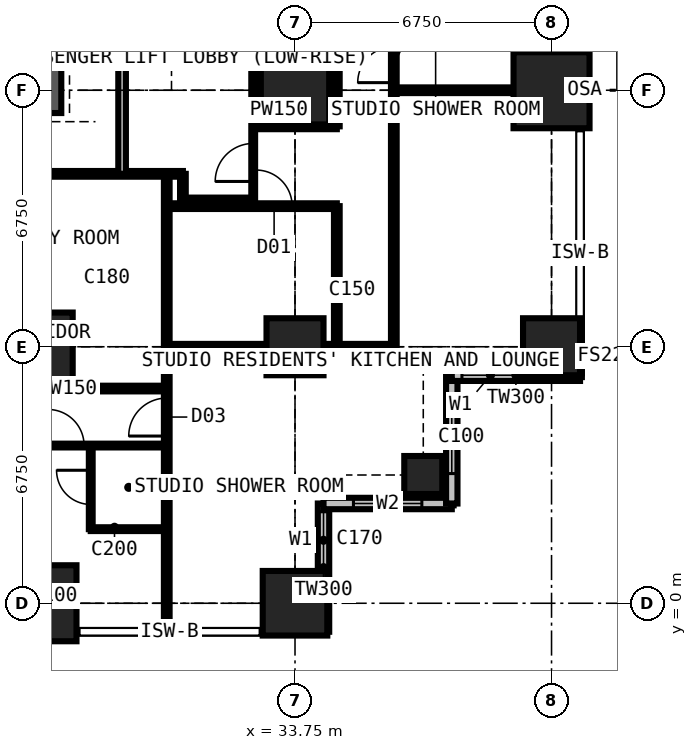
"""IFC4 building model, lengths in metres.
Left out: names, types, materials, properties, quantities, classifications, styles, units other than length and angle.
Written with IfcOpenShell. Run it as: python <this file> out.ifc"""

import sys

from ifc_helpers import new_model, si_unit, direction, frame, frame_2d, origin, origin_2d, place, context, subcontext, project, spatial, rectangle, extrude, element, fill, save


model = new_model("IFC4")
c1 = context("Model", 3, precision=1e-05, world=origin(), true_north=direction((0.0, 1.0)))
c2 = subcontext(c1, "Body", "Model", "MODEL_VIEW")
j1 = project(units=[si_unit("LENGTHUNIT", "METRE"), si_unit("PLANEANGLEUNIT", "RADIAN")], contexts=[c1])
p1 = place(None, origin())
s1 = spatial("IfcSite", under=j1, at=p1, CompositionType="ELEMENT")
p2 = place(p1, origin())
s2 = spatial("IfcBuilding", under=s1, at=p2, CompositionType="ELEMENT")
p3 = place(p2, frame((0.0, 0.0, 134.1)))
s3 = spatial("IfcBuildingStorey", under=s2, at=p3, CompositionType="ELEMENT", Elevation=134.1)
p4 = place(p3, frame((27.0, 0.0, 0.0), z_axis=(0.0, 0.0, 1.0), x_axis=(1.0, 0.0, 0.0)))
e1 = element("IfcColumn", 1, at=p4, inside=s3, PredefinedType="COLUMN", context=c2, shape_type="SweptSolid", body=[
    extrude(rectangle(XDim=2.0, YDim=2.0, at=origin_2d()), origin(), (0.0, 0.0, 1.0), 3.6),
])
p5 = place(p3, frame((27.0, 6.75, 0.0), z_axis=(0.0, 0.0, 1.0), x_axis=(1.0, 0.0, 0.0)))
e2 = element("IfcColumn", 2, at=p5, inside=s3, PredefinedType="COLUMN", context=c2, shape_type="SweptSolid", body=[
    extrude(rectangle(XDim=1.8, YDim=1.8, at=origin_2d()), origin(), (0.0, 0.0, 1.0), 3.6),
])
p6 = place(p3, frame((33.75, 0.0, 0.0), z_axis=(0.0, 0.0, 1.0), x_axis=(1.0, 0.0, 0.0)))
e3 = element("IfcColumn", 3, at=p6, inside=s3, PredefinedType="COLUMN", context=c2, shape_type="SweptSolid", body=[
    extrude(rectangle(XDim=1.7, YDim=1.7, at=origin_2d()), origin(), (0.0, 0.0, 1.0), 3.6),
])
p7 = place(p3, frame((33.75, 6.75, 0.0), z_axis=(0.0, 0.0, 1.0), x_axis=(1.0, 0.0, 0.0)))
e4 = element("IfcColumn", 4, at=p7, inside=s3, PredefinedType="COLUMN", context=c2, shape_type="SweptSolid", body=[
    extrude(rectangle(XDim=1.5, YDim=1.5, at=origin_2d()), origin(), (0.0, 0.0, 1.0), 3.6),
])
p8 = place(p3, frame((33.75, 13.5, 0.0), z_axis=(0.0, 0.0, 1.0), x_axis=(1.0, 0.0, 0.0)))
e5 = element("IfcColumn", 5, at=p8, inside=s3, PredefinedType="COLUMN", context=c2, shape_type="SweptSolid", body=[
    extrude(rectangle(XDim=1.8, YDim=1.8, at=origin_2d()), origin(), (0.0, 0.0, 1.0), 3.6),
])
p9 = place(p3, frame((37.125, 3.375, 0.0), z_axis=(0.0, 0.0, 1.0), x_axis=(1.0, 0.0, 0.0)))
e6 = element("IfcColumn", 6, at=p9, inside=s3, PredefinedType="COLUMN", context=c2, shape_type="SweptSolid", body=[
    extrude(rectangle(XDim=1.0, YDim=1.0, at=origin_2d()), origin(), (0.0, 0.0, 1.0), 3.6),
])
p10 = place(p3, frame((40.5, 6.75, 0.0), z_axis=(0.0, 0.0, 1.0), x_axis=(1.0, 0.0, 0.0)))
e7 = element("IfcColumn", 7, at=p10, inside=s3, PredefinedType="COLUMN", context=c2, shape_type="SweptSolid", body=[
    extrude(rectangle(XDim=1.5, YDim=1.5, at=origin_2d()), origin(), (0.0, 0.0, 1.0), 3.6),
])
p11 = place(p3, frame((40.5, 13.5, 0.0), z_axis=(0.0, 0.0, 1.0), x_axis=(1.0, 0.0, 0.0)))
e8 = element("IfcColumn", 8, at=p11, inside=s3, PredefinedType="COLUMN", context=c2, shape_type="SweptSolid", body=[
    extrude(rectangle(XDim=2.0, YDim=2.0, at=origin_2d()), origin(), (0.0, 0.0, 1.0), 3.6),
])
p12 = place(p3, frame((12.9, 13.5, 0.0), z_axis=(0.0, 0.0, 1.0), x_axis=(1.0, 0.0, 0.0)))
e9 = element("IfcWall", 9, at=p12, inside=s3, PredefinedType="SHEAR", context=c2, shape_type="SweptSolid", body=[
    extrude(rectangle(XDim=14.7, YDim=1.2, at=frame_2d((7.35, 0.0))), origin(), (0.0, 0.0, 1.0), 3.6),
])
p13 = place(p3, frame((27.0, 14.1, 0.0), z_axis=(0.0, 0.0, 1.0), x_axis=(0.0, 1.0, 0.0)))
e10 = element("IfcWall", 10, at=p13, inside=s3, PredefinedType="SHEAR", context=c2, shape_type="SweptSolid", body=[
    extrude(rectangle(XDim=12.3, YDim=1.2, at=frame_2d((6.15, 0.0))), origin(), (0.0, 0.0, 1.0), 3.6),
])
p14 = place(p13, frame((3.65, 0.0, 0.0)))
e11 = element("IfcOpeningElement", 11, at=p14, cuts=e10, PredefinedType="OPENING", context=c2, shape_type="SweptSolid", body=[
    extrude(rectangle(XDim=1.2, YDim=2.2, at=frame_2d((0.6, 1.1))), frame((0.0, 0.61, 0.0), z_axis=(0.0, -1.0, 0.0), x_axis=(1.0, 0.0, 0.0)), (0.0, 0.0, 1.0), 1.22),
])
p15 = place(p3, frame((34.5, -0.75, 0.0), z_axis=(0.0, 0.0, 1.0), x_axis=(0.0, 1.0, 0.0)))
e12 = element("IfcWall", 12, at=p15, inside=s3, PredefinedType="SOLIDWALL", context=c2, shape_type="SweptSolid", body=[
    extrude(rectangle(XDim=3.375, YDim=0.3, at=frame_2d((1.688, 0.0))), origin(), (0.0, 0.0, 1.0), 3.3),
])
p16 = place(p15, frame((1.657, 0.0, 0.9)))
e13 = element("IfcOpeningElement", 13, at=p16, cuts=e12, PredefinedType="OPENING", context=c2, shape_type="SweptSolid", body=[
    extrude(rectangle(XDim=1.5, YDim=1.8, at=frame_2d((0.75, 0.9))), frame((0.0, 0.16, 0.0), z_axis=(0.0, -1.0, 0.0), x_axis=(1.0, 0.0, 0.0)), (0.0, 0.0, 1.0), 0.32),
])
p17 = place(p3, frame((34.5, 2.625, 0.0), z_axis=(0.0, 0.0, 1.0), x_axis=(1.0, 0.0, 0.0)))
e14 = element("IfcWall", 14, at=p17, inside=s3, PredefinedType="SOLIDWALL", context=c2, shape_type="SweptSolid", body=[
    extrude(rectangle(XDim=3.375, YDim=0.3, at=frame_2d((1.688, 0.0))), origin(), (0.0, 0.0, 1.0), 3.3),
])
p18 = place(p17, frame((0.788, 0.0, 0.6)))
e15 = element("IfcOpeningElement", 15, at=p18, cuts=e14, PredefinedType="OPENING", context=c2, shape_type="SweptSolid", body=[
    extrude(rectangle(XDim=1.8, YDim=2.1, at=frame_2d((0.9, 1.05))), frame((0.0, 0.16, 0.0), z_axis=(0.0, -1.0, 0.0), x_axis=(1.0, 0.0, 0.0)), (0.0, 0.0, 1.0), 0.32),
])
p19 = place(p3, frame((37.875, 2.625, 0.0), z_axis=(0.0, 0.0, 1.0), x_axis=(0.0, 1.0, 0.0)))
e16 = element("IfcWall", 16, at=p19, inside=s3, PredefinedType="SOLIDWALL", context=c2, shape_type="SweptSolid", body=[
    extrude(rectangle(XDim=3.375, YDim=0.3, at=frame_2d((1.688, 0.0))), origin(), (0.0, 0.0, 1.0), 3.3),
])
p20 = place(p19, frame((0.788, 0.0, 0.6)))
e17 = element("IfcOpeningElement", 17, at=p20, cuts=e16, PredefinedType="OPENING", context=c2, shape_type="SweptSolid", body=[
    extrude(rectangle(XDim=1.8, YDim=2.1, at=frame_2d((0.9, 1.05))), frame((0.0, 0.16, 0.0), z_axis=(0.0, -1.0, 0.0), x_axis=(1.0, 0.0, 0.0)), (0.0, 0.0, 1.0), 0.32),
])
p21 = place(p3, frame((37.875, 6.0, 0.0), z_axis=(0.0, 0.0, 1.0), x_axis=(1.0, 0.0, 0.0)))
e18 = element("IfcWall", 18, at=p21, inside=s3, PredefinedType="SOLIDWALL", context=c2, shape_type="SweptSolid", body=[
    extrude(rectangle(XDim=3.375, YDim=0.3, at=frame_2d((1.688, 0.0))), origin(), (0.0, 0.0, 1.0), 3.3),
])
p22 = place(p21, frame((0.268, 0.0, 0.9)))
e19 = element("IfcOpeningElement", 19, at=p22, cuts=e18, PredefinedType="OPENING", context=c2, shape_type="SweptSolid", body=[
    extrude(rectangle(XDim=1.5, YDim=1.8, at=frame_2d((0.75, 0.9))), frame((0.0, 0.16, 0.0), z_axis=(0.0, -1.0, 0.0), x_axis=(1.0, 0.0, 0.0)), (0.0, 0.0, 1.0), 0.32),
])
p23 = place(p3, frame((6.75, 4.15, 0.0), z_axis=(0.0, 0.0, 1.0), x_axis=(1.0, 0.0, 0.0)))
e20 = element("IfcWall", 20, at=p23, inside=s3, PredefinedType="PARTITIONING", context=c2, shape_type="SweptSolid", body=[
    extrude(rectangle(XDim=23.625, YDim=0.1, at=frame_2d((11.812, 0.0))), origin(), (0.0, 0.0, 1.0), 3.3),
])
p24 = place(p23, frame((2.85, 0.0, 0.0)))
e21 = element("IfcOpeningElement", 21, at=p24, cuts=e20, PredefinedType="OPENING", context=c2, shape_type="SweptSolid", body=[
    extrude(rectangle(XDim=1.0, YDim=2.2, at=frame_2d((0.5, 1.1))), frame((0.0, 0.06, 0.0), z_axis=(0.0, -1.0, 0.0), x_axis=(1.0, 0.0, 0.0)), (0.0, 0.0, 1.0), 0.12),
])
p25 = place(p23, frame((6.95, 0.0, 0.0)))
e22 = element("IfcOpeningElement", 22, at=p25, cuts=e20, PredefinedType="OPENING", context=c2, shape_type="SweptSolid", body=[
    extrude(rectangle(XDim=0.95, YDim=2.2, at=frame_2d((0.475, 1.1))), frame((0.0, 0.06, 0.0), z_axis=(0.0, -1.0, 0.0), x_axis=(1.0, 0.0, 0.0)), (0.0, 0.0, 1.0), 0.12),
])
p26 = place(p23, frame((10.375, 0.0, 0.0)))
e23 = element("IfcOpeningElement", 23, at=p26, cuts=e20, PredefinedType="OPENING", context=c2, shape_type="SweptSolid", body=[
    extrude(rectangle(XDim=0.95, YDim=2.2, at=frame_2d((0.475, 1.1))), frame((0.0, 0.06, 0.0), z_axis=(0.0, -1.0, 0.0), x_axis=(1.0, 0.0, 0.0)), (0.0, 0.0, 1.0), 0.12),
])
p27 = place(p23, frame((15.1, 0.0, 0.0)))
e24 = element("IfcOpeningElement", 24, at=p27, cuts=e20, PredefinedType="OPENING", context=c2, shape_type="SweptSolid", body=[
    extrude(rectangle(XDim=0.95, YDim=2.2, at=frame_2d((0.475, 1.1))), frame((0.0, 0.06, 0.0), z_axis=(0.0, -1.0, 0.0), x_axis=(1.0, 0.0, 0.0)), (0.0, 0.0, 1.0), 0.12),
])
p28 = place(p23, frame((20.5, 0.0, 0.0)))
e25 = element("IfcOpeningElement", 25, at=p28, cuts=e20, PredefinedType="OPENING", context=c2, shape_type="SweptSolid", body=[
    extrude(rectangle(XDim=0.95, YDim=2.2, at=frame_2d((0.475, 1.1))), frame((0.0, 0.06, 0.0), z_axis=(0.0, -1.0, 0.0), x_axis=(1.0, 0.0, 0.0)), (0.0, 0.0, 1.0), 0.12),
])
p29 = place(p3, frame((10.125, 11.3, 0.0), z_axis=(0.0, 0.0, 1.0), x_axis=(1.0, 0.0, 0.0)))
e26 = element("IfcWall", 26, at=p29, inside=s3, PredefinedType="PARTITIONING", context=c2, shape_type="SweptSolid", body=[
    extrude(rectangle(XDim=20.675, YDim=0.15, at=frame_2d((10.337, 0.0))), origin(), (0.0, 0.0, 1.0), 3.3),
])
p30 = place(p29, frame((8.375, 0.0, 0.0)))
e27 = element("IfcOpeningElement", 27, at=p30, cuts=e26, PredefinedType="OPENING", context=c2, shape_type="SweptSolid", body=[
    extrude(rectangle(XDim=1.0, YDim=2.2, at=frame_2d((0.5, 1.1))), frame((0.0, 0.085, 0.0), z_axis=(0.0, -1.0, 0.0), x_axis=(1.0, 0.0, 0.0)), (0.0, 0.0, 1.0), 0.17),
])
p31 = place(p29, frame((10.975, 0.0, 0.0)))
e28 = element("IfcOpeningElement", 28, at=p31, cuts=e26, PredefinedType="OPENING", context=c2, shape_type="SweptSolid", body=[
    extrude(rectangle(XDim=1.0, YDim=2.2, at=frame_2d((0.5, 1.1))), frame((0.0, 0.085, 0.0), z_axis=(0.0, -1.0, 0.0), x_axis=(1.0, 0.0, 0.0)), (0.0, 0.0, 1.0), 0.17),
])
p32 = place(p29, frame((3.925, 0.0, 0.0)))
e29 = element("IfcOpeningElement", 29, at=p32, cuts=e26, PredefinedType="OPENING", context=c2, shape_type="SweptSolid", body=[
    extrude(rectangle(XDim=0.95, YDim=2.2, at=frame_2d((0.475, 1.1))), frame((0.0, 0.085, 0.0), z_axis=(0.0, -1.0, 0.0), x_axis=(1.0, 0.0, 0.0)), (0.0, 0.0, 1.0), 0.17),
])
p33 = place(p3, frame((22.988, 5.65, 0.0), z_axis=(0.0, 0.0, 1.0), x_axis=(1.0, 0.0, 0.0)))
e30 = element("IfcWall", 30, at=p33, inside=s3, PredefinedType="PARTITIONING", context=c2, shape_type="SweptSolid", body=[
    extrude(rectangle(XDim=7.387, YDim=0.15, at=frame_2d((3.694, 0.0))), origin(), (0.0, 0.0, 1.0), 3.3),
])
p34 = place(p33, frame((2.15, 0.0, 0.0)))
e31 = element("IfcOpeningElement", 31, at=p34, cuts=e30, PredefinedType="OPENING", context=c2, shape_type="SweptSolid", body=[
    extrude(rectangle(XDim=0.95, YDim=2.2, at=frame_2d((0.475, 1.1))), frame((0.0, 0.085, 0.0), z_axis=(0.0, -1.0, 0.0), x_axis=(1.0, 0.0, 0.0)), (0.0, 0.0, 1.0), 0.17),
])
p35 = place(p3, frame((28.375, 1.95, 0.0), z_axis=(0.0, 0.0, 1.0), x_axis=(0.0, 1.0, 0.0)))
e32 = element("IfcWall", 32, at=p35, inside=s3, PredefinedType="PARTITIONING", context=c2, shape_type="SweptSolid", body=[
    extrude(rectangle(XDim=2.2, YDim=0.1, at=frame_2d((1.1, 0.0))), origin(), (0.0, 0.0, 1.0), 3.3),
])
p36 = place(p35, frame((0.65, 0.0, 0.0)))
e33 = element("IfcOpeningElement", 33, at=p36, cuts=e32, PredefinedType="OPENING", context=c2, shape_type="SweptSolid", body=[
    extrude(rectangle(XDim=0.9, YDim=2.2, at=frame_2d((0.45, 1.1))), frame((0.0, 0.06, 0.0), z_axis=(0.0, -1.0, 0.0), x_axis=(1.0, 0.0, 0.0)), (0.0, 0.0, 1.0), 0.12),
])
p37 = place(p3, frame((28.375, 1.95, 0.0), z_axis=(0.0, 0.0, 1.0), x_axis=(1.0, 0.0, 0.0)))
e34 = element("IfcWall", 34, at=p37, inside=s3, PredefinedType="PARTITIONING", context=c2, shape_type="SweptSolid", body=[
    extrude(rectangle(XDim=2.0, YDim=0.1, at=frame_2d((1.0, 0.0))), origin(), (0.0, 0.0, 1.0), 3.3),
])
p38 = place(p3, frame((29.2, 11.3, 0.0), z_axis=(0.0, 0.0, 1.0), x_axis=(0.0, 1.0, 0.0)))
e35 = element("IfcWall", 35, at=p38, inside=s3, PredefinedType="PARTITIONING", context=c2, shape_type="SweptSolid", body=[
    extrude(rectangle(XDim=17.9, YDim=0.2, at=frame_2d((8.95, 0.0))), origin(), (0.0, 0.0, 1.0), 3.3),
])
p39 = place(p38, frame((8.35, 0.0, 0.0)))
e36 = element("IfcOpeningElement", 36, at=p39, cuts=e35, PredefinedType="OPENING", context=c2, shape_type="SweptSolid", body=[
    extrude(rectangle(XDim=1.2, YDim=2.2, at=frame_2d((0.6, 1.1))), frame((0.0, 0.11, 0.0), z_axis=(0.0, -1.0, 0.0), x_axis=(1.0, 0.0, 0.0)), (0.0, 0.0, 1.0), 0.22),
])
p40 = place(p3, frame((30.375, -0.734, 0.0), z_axis=(0.0, 0.0, 1.0), x_axis=(0.0, 1.0, 0.0)))
e37 = element("IfcWall", 37, at=p40, inside=s3, PredefinedType="PARTITIONING", context=c2, shape_type="SweptSolid", body=[
    extrude(rectangle(XDim=12.034, YDim=0.15, at=frame_2d((6.017, 0.0))), origin(), (0.0, 0.0, 1.0), 3.3),
])
p41 = place(p40, frame((5.134, 0.0, 0.0)))
e38 = element("IfcOpeningElement", 38, at=p41, cuts=e37, PredefinedType="OPENING", context=c2, shape_type="SweptSolid", body=[
    extrude(rectangle(XDim=1.0, YDim=2.2, at=frame_2d((0.5, 1.1))), frame((0.0, 0.085, 0.0), z_axis=(0.0, -1.0, 0.0), x_axis=(1.0, 0.0, 0.0)), (0.0, 0.0, 1.0), 0.17),
])
p42 = place(p3, frame((30.375, 6.75, 0.0), z_axis=(0.0, 0.0, 1.0), x_axis=(1.0, 0.0, 0.0)))
e39 = element("IfcWall", 39, at=p42, inside=s3, PredefinedType="PARTITIONING", context=c2, shape_type="SweptSolid", body=[
    extrude(rectangle(XDim=5.975, YDim=0.15, at=frame_2d((2.988, 0.0))), origin(), (0.0, 0.0, 1.0), 2.802),
])
p43 = place(p3, frame((30.375, 10.45, 0.0), z_axis=(0.0, 0.0, 1.0), x_axis=(1.0, 0.0, 0.0)))
e40 = element("IfcWall", 40, at=p43, inside=s3, PredefinedType="PARTITIONING", context=c2, shape_type="SweptSolid", body=[
    extrude(rectangle(XDim=4.475, YDim=0.15, at=frame_2d((2.238, 0.0))), origin(), (0.0, 0.0, 1.0), 3.3),
])
p44 = place(p43, frame((2.35, 0.0, 0.0)))
e41 = element("IfcOpeningElement", 41, at=p44, cuts=e40, PredefinedType="OPENING", context=c2, shape_type="SweptSolid", body=[
    extrude(rectangle(XDim=0.95, YDim=2.2, at=frame_2d((0.475, 1.1))), frame((0.0, 0.085, 0.0), z_axis=(0.0, -1.0, 0.0), x_axis=(1.0, 0.0, 0.0)), (0.0, 0.0, 1.0), 0.17),
])
p45 = place(p3, frame((30.8, 10.6, 0.0), z_axis=(0.0, 0.0, 1.0), x_axis=(0.0, 1.0, 0.0)))
e42 = element("IfcWall", 42, at=p45, inside=s3, PredefinedType="PARTITIONING", context=c2, shape_type="SweptSolid", body=[
    extrude(rectangle(XDim=0.7, YDim=0.15, at=frame_2d((0.35, 0.0))), origin(), (0.0, 0.0, 1.0), 3.3),
])
p46 = place(p3, frame((30.8, 10.6, 0.0), z_axis=(0.0, 0.0, 1.0), x_axis=(1.0, 0.0, 0.0)))
e43 = element("IfcWall", 43, at=p46, inside=s3, PredefinedType="PARTITIONING", context=c2, shape_type="SweptSolid", body=[
    extrude(rectangle(XDim=1.85, YDim=0.15, at=frame_2d((0.925, 0.0))), origin(), (0.0, 0.0, 1.0), 3.3),
])
p47 = place(p3, frame((32.65, 10.6, 0.0), z_axis=(0.0, 0.0, 1.0), x_axis=(0.0, 1.0, 0.0)))
e44 = element("IfcWall", 44, at=p47, inside=s3, PredefinedType="SHEAR", context=c2, shape_type="SweptSolid", body=[
    extrude(rectangle(XDim=9.3, YDim=0.1, at=frame_2d((4.65, 0.0))), origin(), (0.0, 0.0, 1.0), 3.3),
])
p48 = place(p47, frame((0.5, 0.0, 0.0)))
e45 = element("IfcOpeningElement", 45, at=p48, cuts=e44, PredefinedType="OPENING", context=c2, shape_type="SweptSolid", body=[
    extrude(rectangle(XDim=1.0, YDim=2.2, at=frame_2d((0.5, 1.1))), frame((0.0, 0.06, 0.0), z_axis=(0.0, -1.0, 0.0), x_axis=(1.0, 0.0, 0.0)), (0.0, 0.0, 1.0), 0.12),
])
p49 = place(p3, frame((32.65, 12.55, 0.0), z_axis=(0.0, 0.0, 1.0), x_axis=(1.0, 0.0, 0.0)))
e46 = element("IfcWall", 46, at=p49, inside=s3, PredefinedType="PARTITIONING", context=c2, shape_type="SweptSolid", body=[
    extrude(rectangle(XDim=2.2, YDim=0.15, at=frame_2d((1.1, 0.0))), origin(), (0.0, 0.0, 1.0), 3.3),
])
p50 = place(p3, frame((34.85, 6.75, 0.0), z_axis=(0.0, 0.0, 1.0), x_axis=(0.0, 1.0, 0.0)))
e47 = element("IfcWall", 47, at=p50, inside=s3, PredefinedType="PARTITIONING", context=c2, shape_type="SweptSolid", body=[
    extrude(rectangle(XDim=3.7, YDim=0.15, at=frame_2d((1.85, 0.0))), origin(), (0.0, 0.0, 1.0), 3.3),
])
p51 = place(p3, frame((34.85, 12.55, 0.0), z_axis=(0.0, 0.0, 1.0), x_axis=(0.0, 1.0, 0.0)))
e48 = element("IfcWall", 48, at=p51, inside=s3, PredefinedType="PARTITIONING", context=c2, shape_type="SweptSolid", body=[
    extrude(rectangle(XDim=17.825, YDim=0.15, at=frame_2d((8.913, 0.0))), origin(), (0.0, 0.0, 1.0), 3.3),
])
p52 = place(p51, frame((8.5, 0.0, 0.0)))
e49 = element("IfcOpeningElement", 49, at=p52, cuts=e48, PredefinedType="OPENING", context=c2, shape_type="SweptSolid", body=[
    extrude(rectangle(XDim=0.95, YDim=2.2, at=frame_2d((0.475, 1.1))), frame((0.0, 0.085, 0.0), z_axis=(0.0, -1.0, 0.0), x_axis=(1.0, 0.0, 0.0)), (0.0, 0.0, 1.0), 0.17),
])
p53 = place(p3, frame((36.35, 6.75, 0.0), z_axis=(0.0, 0.0, 1.0), x_axis=(0.0, 1.0, 0.0)))
e50 = element("IfcWall", 50, at=p53, inside=s3, PredefinedType="PARTITIONING", context=c2, shape_type="SweptSolid", body=[
    extrude(rectangle(XDim=20.25, YDim=0.15, at=frame_2d((10.125, 0.0))), origin(), (0.0, 0.0, 1.0), 3.3),
])
p54 = place(p53, frame((6.95, 0.0, 0.0)))
e51 = element("IfcOpeningElement", 51, at=p54, cuts=e50, PredefinedType="OPENING", context=c2, shape_type="SweptSolid", body=[
    extrude(rectangle(XDim=0.95, YDim=2.2, at=frame_2d((0.475, 1.1))), frame((0.0, 0.085, 0.0), z_axis=(0.0, -1.0, 0.0), x_axis=(1.0, 0.0, 0.0)), (0.0, 0.0, 1.0), 0.17),
])
p55 = place(p53, frame((10.375, 0.0, 0.0)))
e52 = element("IfcOpeningElement", 52, at=p55, cuts=e50, PredefinedType="OPENING", context=c2, shape_type="SweptSolid", body=[
    extrude(rectangle(XDim=0.95, YDim=2.2, at=frame_2d((0.475, 1.1))), frame((0.0, 0.085, 0.0), z_axis=(0.0, -1.0, 0.0), x_axis=(1.0, 0.0, 0.0)), (0.0, 0.0, 1.0), 0.17),
])
p56 = place(p53, frame((13.75, 0.0, 0.0)))
e53 = element("IfcOpeningElement", 53, at=p56, cuts=e50, PredefinedType="OPENING", context=c2, shape_type="SweptSolid", body=[
    extrude(rectangle(XDim=0.95, YDim=2.2, at=frame_2d((0.475, 1.1))), frame((0.0, 0.085, 0.0), z_axis=(0.0, -1.0, 0.0), x_axis=(1.0, 0.0, 0.0)), (0.0, 0.0, 1.0), 0.17),
])
p57 = place(p53, frame((17.125, 0.0, 0.0)))
e54 = element("IfcOpeningElement", 54, at=p57, cuts=e50, PredefinedType="OPENING", context=c2, shape_type="SweptSolid", body=[
    extrude(rectangle(XDim=0.95, YDim=2.2, at=frame_2d((0.475, 1.1))), frame((0.0, 0.085, 0.0), z_axis=(0.0, -1.0, 0.0), x_axis=(1.0, 0.0, 0.0)), (0.0, 0.0, 1.0), 0.17),
])
p58 = place(p3, frame((36.35, 13.5, 0.0), z_axis=(0.0, 0.0, 1.0), x_axis=(1.0, 0.0, 0.0)))
e55 = element("IfcWall", 55, at=p58, inside=s3, PredefinedType="PARTITIONING", context=c2, shape_type="SweptSolid", body=[
    extrude(rectangle(XDim=4.884, YDim=0.15, at=frame_2d((2.442, 0.0))), origin(), (0.0, 0.0, 1.0), 2.802),
])
p59 = place(p16, origin())
e56 = element("IfcWindow", 56, at=p59, inside=s3, PartitioningType="SINGLE_PANEL", PredefinedType="WINDOW", context=c2, shape_type="SweptSolid", body=[
    extrude(rectangle(XDim=1.5, YDim=1.8, at=frame_2d((0.75, 0.9))), frame((0.0, 0.03, 0.0), z_axis=(0.0, -1.0, 0.0), x_axis=(1.0, 0.0, 0.0)), (0.0, 0.0, 1.0), 0.06),
])
fill(e13, e56)
p60 = place(p18, origin())
e57 = element("IfcWindow", 57, at=p60, inside=s3, PartitioningType="SINGLE_PANEL", PredefinedType="WINDOW", context=c2, shape_type="SweptSolid", body=[
    extrude(rectangle(XDim=1.8, YDim=2.1, at=frame_2d((0.9, 1.05))), frame((0.0, 0.03, 0.0), z_axis=(0.0, -1.0, 0.0), x_axis=(1.0, 0.0, 0.0)), (0.0, 0.0, 1.0), 0.06),
])
fill(e15, e57)
p61 = place(p20, origin())
e58 = element("IfcWindow", 58, at=p61, inside=s3, PartitioningType="SINGLE_PANEL", PredefinedType="WINDOW", context=c2, shape_type="SweptSolid", body=[
    extrude(rectangle(XDim=1.8, YDim=2.1, at=frame_2d((0.9, 1.05))), frame((0.0, 0.03, 0.0), z_axis=(0.0, -1.0, 0.0), x_axis=(1.0, 0.0, 0.0)), (0.0, 0.0, 1.0), 0.06),
])
fill(e17, e58)
p62 = place(p22, origin())
e59 = element("IfcWindow", 59, at=p62, inside=s3, PartitioningType="SINGLE_PANEL", PredefinedType="WINDOW", context=c2, shape_type="SweptSolid", body=[
    extrude(rectangle(XDim=1.5, YDim=1.8, at=frame_2d((0.75, 0.9))), frame((0.0, 0.03, 0.0), z_axis=(0.0, -1.0, 0.0), x_axis=(1.0, 0.0, 0.0)), (0.0, 0.0, 1.0), 0.06),
])
fill(e19, e59)
p63 = place(p28, origin())
e60 = element("IfcDoor", 60, at=p63, inside=s3, OperationType="SINGLE_SWING_LEFT", PredefinedType="DOOR", context=c2, shape_type="SweptSolid", body=[
    extrude(rectangle(XDim=0.95, YDim=2.2, at=frame_2d((0.475, 1.1))), frame((0.0, 0.025, 0.0), z_axis=(0.0, -1.0, 0.0), x_axis=(1.0, 0.0, 0.0)), (0.0, 0.0, 1.0), 0.05),
])
fill(e25, e60)
p64 = place(p36, origin())
e61 = element("IfcDoor", 61, at=p64, inside=s3, OperationType="SINGLE_SWING_RIGHT", PredefinedType="DOOR", context=c2, shape_type="SweptSolid", body=[
    extrude(rectangle(XDim=0.9, YDim=2.2, at=frame_2d((0.45, 1.1))), frame((0.0, 0.025, 0.0), z_axis=(0.0, -1.0, 0.0), x_axis=(1.0, 0.0, 0.0)), (0.0, 0.0, 1.0), 0.05),
])
fill(e33, e61)
p65 = place(p41, origin())
e62 = element("IfcDoor", 62, at=p65, inside=s3, OperationType="SINGLE_SWING_LEFT", PredefinedType="DOOR", context=c2, shape_type="SweptSolid", body=[
    extrude(rectangle(XDim=1.0, YDim=2.2, at=frame_2d((0.5, 1.1))), frame((0.0, 0.025, 0.0), z_axis=(0.0, -1.0, 0.0), x_axis=(1.0, 0.0, 0.0)), (0.0, 0.0, 1.0), 0.05),
])
fill(e38, e62)
p66 = place(p54, origin())
e63 = element("IfcDoor", 63, at=p66, inside=s3, OperationType="SINGLE_SWING_LEFT", PredefinedType="DOOR", context=c2, shape_type="SweptSolid", body=[
    extrude(rectangle(XDim=0.95, YDim=2.2, at=frame_2d((0.475, 1.1))), frame((0.0, 0.025, 0.0), z_axis=(0.0, -1.0, 0.0), x_axis=(1.0, 0.0, 0.0)), (0.0, 0.0, 1.0), 0.05),
])
fill(e51, e63)
p67 = place(p48, origin())
e64 = element("IfcDoor", 64, at=p67, inside=s3, OperationType="SINGLE_SWING_LEFT", PredefinedType="DOOR", context=c2, shape_type="SweptSolid", body=[
    extrude(rectangle(XDim=1.0, YDim=2.2, at=frame_2d((0.5, 1.1))), frame((0.0, 0.025, 0.0), z_axis=(0.0, -1.0, 0.0), x_axis=(1.0, 0.0, 0.0)), (0.0, 0.0, 1.0), 0.05),
])
fill(e45, e64)
p68 = place(p44, origin())
e65 = element("IfcDoor", 65, at=p68, inside=s3, OperationType="SINGLE_SWING_LEFT", PredefinedType="DOOR", context=c2, shape_type="SweptSolid", body=[
    extrude(rectangle(XDim=0.95, YDim=2.2, at=frame_2d((0.475, 1.1))), frame((0.0, 0.025, 0.0), z_axis=(0.0, -1.0, 0.0), x_axis=(1.0, 0.0, 0.0)), (0.0, 0.0, 1.0), 0.05),
])
fill(e41, e65)
save(model, sys.argv[1])
